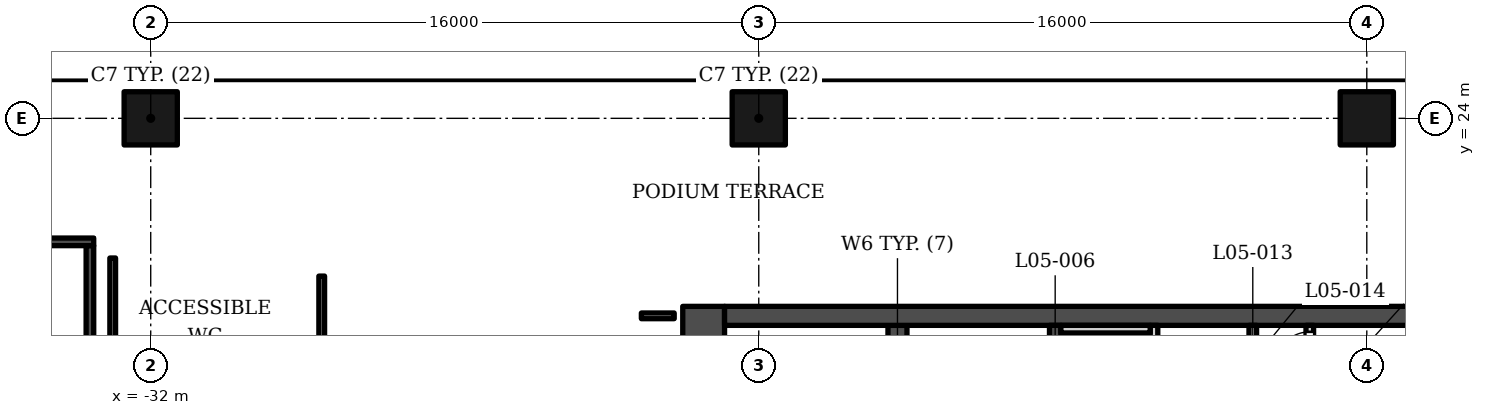
"""IFC4 building model, lengths in metres.
Left out: names, types, materials, properties, quantities, classifications, styles, units other than length and angle.
Written with IfcOpenShell. Run it as: python <this file> out.ifc"""

import sys

from ifc_helpers import new_model, si_unit, direction, frame, frame_2d, origin, origin_2d, place, context, subcontext, project, spatial, rectangle, extrude, element, fill, save


model = new_model("IFC4")
c1 = context("Model", 3, precision=1e-05, world=origin(), true_north=direction((0.0, 1.0)))
c2 = subcontext(c1, "Body", "Model", "MODEL_VIEW")
j1 = project(units=[si_unit("LENGTHUNIT", "METRE"), si_unit("PLANEANGLEUNIT", "RADIAN")], contexts=[c1])
p1 = place(None, origin())
s1 = spatial("IfcSite", under=j1, at=p1, CompositionType="ELEMENT")
p2 = place(p1, origin())
s2 = spatial("IfcBuilding", under=s1, at=p2, CompositionType="ELEMENT")
p3 = place(p2, frame((0.0, 0.0, 40.0)))
s3 = spatial("IfcBuildingStorey", under=s2, at=p3, CompositionType="ELEMENT", Elevation=40.0)
for number, where, z_axis, x_axis in (
    (1, (-32.0, 24.0, 0.0), (0.0, 0.0, 1.0), (1.0, 0.0, 0.0)),
    (2, (-16.0, 24.0, 0.0), (0.0, 0.0, 1.0), (1.0, 0.0, 0.0)),
    (3, (0.0, 24.0, 0.0), (0.0, 0.0, 1.0), (1.0, 0.0, 0.0)),
):
    element("IfcColumn", number, at=place(p3, frame(where, z_axis=z_axis, x_axis=x_axis)), inside=s3, PredefinedType="COLUMN", context=c2, shape_type="SweptSolid", body=[
        extrude(rectangle(XDim=1.4, YDim=1.4, at=origin_2d()), origin(), (0.0, 0.0, 1.0), 6.0),
    ])
p4 = place(p3, frame((-16.9, 18.802, 0.0), z_axis=(0.0, 0.0, 1.0), x_axis=(1.0, 0.0, 0.0)))
e4 = element("IfcWall", 4, at=p4, inside=s3, PredefinedType="SHEAR", context=c2, shape_type="SweptSolid", body=[
    extrude(rectangle(XDim=33.8, YDim=0.5, at=frame_2d((16.9, 0.0))), origin(), (0.0, 0.0, 1.0), 6.0),
])
p5 = place(p3, frame((-12.35, 5.253, 0.0), z_axis=(0.0, 0.0, 1.0), x_axis=(0.0, 1.0, 0.0)))
e5 = element("IfcWall", 5, at=p5, inside=s3, PredefinedType="SHEAR", context=c2, shape_type="SweptSolid", body=[
    extrude(rectangle(XDim=13.3, YDim=0.5, at=frame_2d((6.65, 0.0))), origin(), (0.0, 0.0, 1.0), 6.0),
])
p6 = place(p3, frame((-8.2, 5.253, 0.0), z_axis=(0.0, 0.0, 1.0), x_axis=(0.0, 1.0, 0.0)))
e6 = element("IfcWall", 6, at=p6, inside=s3, PredefinedType="SHEAR", context=c2, shape_type="SweptSolid", body=[
    extrude(rectangle(XDim=13.3, YDim=0.3, at=frame_2d((6.65, 0.0))), origin(), (0.0, 0.0, 1.0), 6.0),
])
p7 = place(p6, frame((7.1, 0.0, 0.0)))
e7 = element("IfcOpeningElement", 7, at=p7, cuts=e6, PredefinedType="OPENING", context=c2, shape_type="SweptSolid", body=[
    extrude(rectangle(XDim=1.4, YDim=2.1, at=frame_2d((0.7, 1.05))), frame((0.0, 0.16, 0.0), z_axis=(0.0, -1.0, 0.0), x_axis=(1.0, 0.0, 0.0)), (0.0, 0.0, 1.0), 0.32),
])
p8 = place(p6, frame((5.05, 0.0, 0.0)))
e8 = element("IfcOpeningElement", 8, at=p8, cuts=e6, PredefinedType="OPENING", context=c2, shape_type="SweptSolid", body=[
    extrude(rectangle(XDim=1.4, YDim=2.1, at=frame_2d((0.7, 1.05))), frame((0.0, 0.16, 0.0), z_axis=(0.0, -1.0, 0.0), x_axis=(1.0, 0.0, 0.0)), (0.0, 0.0, 1.0), 0.32),
])
p9 = place(p3, frame((-17.45, 5.853, 0.0), z_axis=(0.0, 0.0, 1.0), x_axis=(0.0, 1.0, 0.0)))
e9 = element("IfcWall", 9, at=p9, inside=s3, PredefinedType="SHEAR", context=c2, shape_type="SweptSolid", body=[
    extrude(rectangle(XDim=13.2, YDim=1.1, at=frame_2d((6.6, 0.0))), origin(), (0.0, 0.0, 1.0), 6.0),
])
p10 = place(p9, frame((4.1, 0.0, 0.0)))
e10 = element("IfcOpeningElement", 10, at=p10, cuts=e9, PredefinedType="OPENING", context=c2, shape_type="SweptSolid", body=[
    extrude(rectangle(XDim=1.6, YDim=2.1, at=frame_2d((0.8, 1.05))), frame((0.0, 0.56, 0.0), z_axis=(0.0, -1.0, 0.0), x_axis=(1.0, 0.0, 0.0)), (0.0, 0.0, 1.0), 1.12),
])
p11 = place(p9, frame((9.75, 0.0, 0.0)))
e11 = element("IfcOpeningElement", 11, at=p11, cuts=e9, PredefinedType="OPENING", context=c2, shape_type="SweptSolid", body=[
    extrude(rectangle(XDim=0.9, YDim=2.1, at=frame_2d((0.45, 1.05))), frame((0.0, 0.56, 0.0), z_axis=(0.0, -1.0, 0.0), x_axis=(1.0, 0.0, 0.0)), (0.0, 0.0, 1.0), 1.12),
])
p12 = place(p3, frame((-5.6, 14.253, 0.0), z_axis=(0.0, 0.0, 1.0), x_axis=(0.0, 1.0, 0.0)))
e12 = element("IfcWall", 12, at=p12, inside=s3, PredefinedType="SOLIDWALL", context=c2, shape_type="SweptSolid", body=[
    extrude(rectangle(XDim=4.3, YDim=0.2, at=frame_2d((2.15, 0.0))), origin(), (0.0, 0.0, 1.0), 5.55),
])
p13 = place(p3, frame((-3.0, 15.503, 0.0), z_axis=(0.0, 0.0, 1.0), x_axis=(0.0, 1.0, 0.0)))
e13 = element("IfcWall", 13, at=p13, inside=s3, PredefinedType="SOLIDWALL", context=c2, shape_type="SweptSolid", body=[
    extrude(rectangle(XDim=3.05, YDim=0.2, at=frame_2d((1.525, 0.0))), origin(), (0.0, 0.0, 1.0), 5.55),
])
p14 = place(p13, frame((0.12, 0.0, 0.0)))
e14 = element("IfcOpeningElement", 14, at=p14, cuts=e13, PredefinedType="OPENING", context=c2, shape_type="SweptSolid", body=[
    extrude(rectangle(XDim=0.9, YDim=2.1, at=frame_2d((0.45, 1.05))), frame((0.0, 0.11, 0.0), z_axis=(0.0, -1.0, 0.0), x_axis=(1.0, 0.0, 0.0)), (0.0, 0.0, 1.0), 0.22),
])
p15 = place(p13, frame((1.67, 0.0, 0.0)))
e15 = element("IfcOpeningElement", 15, at=p15, cuts=e13, PredefinedType="OPENING", context=c2, shape_type="SweptSolid", body=[
    extrude(rectangle(XDim=0.9, YDim=2.1, at=frame_2d((0.45, 1.05))), frame((0.0, 0.11, 0.0), z_axis=(0.0, -1.0, 0.0), x_axis=(1.0, 0.0, 0.0)), (0.0, 0.0, 1.0), 0.22),
])
p16 = place(p3, frame((-1.5, 15.503, 0.0), z_axis=(0.0, 0.0, 1.0), x_axis=(0.0, 1.0, 0.0)))
e16 = element("IfcWall", 16, at=p16, inside=s3, PredefinedType="SOLIDWALL", context=c2, shape_type="SweptSolid", body=[
    extrude(rectangle(XDim=3.05, YDim=0.2, at=frame_2d((1.525, 0.0))), origin(), (0.0, 0.0, 1.0), 5.55),
])
p17 = place(p16, frame((0.43, 0.0, 0.0)))
e17 = element("IfcOpeningElement", 17, at=p17, cuts=e16, PredefinedType="OPENING", context=c2, shape_type="SweptSolid", body=[
    extrude(rectangle(XDim=0.9, YDim=2.1, at=frame_2d((0.45, 1.05))), frame((0.0, 0.11, 0.0), z_axis=(0.0, -1.0, 0.0), x_axis=(1.0, 0.0, 0.0)), (0.0, 0.0, 1.0), 0.22),
])
p18 = place(p16, frame((1.98, 0.0, 0.0)))
e18 = element("IfcOpeningElement", 18, at=p18, cuts=e16, PredefinedType="OPENING", context=c2, shape_type="SweptSolid", body=[
    extrude(rectangle(XDim=0.9, YDim=2.1, at=frame_2d((0.45, 1.05))), frame((0.0, 0.11, 0.0), z_axis=(0.0, -1.0, 0.0), x_axis=(1.0, 0.0, 0.0)), (0.0, 0.0, 1.0), 0.22),
])
p19 = place(p3, frame((-8.05, 18.453, 0.0), z_axis=(0.0, 0.0, 1.0), x_axis=(1.0, 0.0, 0.0)))
e19 = element("IfcWall", 19, at=p19, inside=s3, PredefinedType="SOLIDWALL", context=c2, shape_type="SweptSolid", body=[
    extrude(rectangle(XDim=2.35, YDim=0.2, at=frame_2d((1.175, 0.0))), origin(), (0.0, 0.0, 1.0), 5.55),
])
p20 = place(p3, frame((-38.37, 20.75, 0.0), z_axis=(0.0, 0.0, 1.0), x_axis=(1.0, 0.0, 0.0)))
e20 = element("IfcWall", 20, at=p20, inside=s3, PredefinedType="SOLIDWALL", context=c2, shape_type="SweptSolid", body=[
    extrude(rectangle(XDim=4.87, YDim=0.2, at=frame_2d((2.435, 0.0))), origin(), (0.0, 0.0, 1.0), 3.0),
])
p21 = place(p3, frame((-33.6, 14.0, 0.0), z_axis=(0.0, 0.0, 1.0), x_axis=(0.0, 1.0, 0.0)))
e21 = element("IfcWall", 21, at=p21, inside=s3, PredefinedType="SOLIDWALL", context=c2, shape_type="SweptSolid", body=[
    extrude(rectangle(XDim=6.65, YDim=0.2, at=frame_2d((3.325, 0.0))), origin(), (0.0, 0.0, 1.0), 3.0),
])
p22 = place(p21, frame((0.1, 0.0, 0.0)))
e22 = element("IfcOpeningElement", 22, at=p22, cuts=e21, PredefinedType="OPENING", context=c2, shape_type="SweptSolid", body=[
    extrude(rectangle(XDim=1.8, YDim=2.4, at=frame_2d((0.9, 1.2))), frame((0.0, 0.11, 0.0), z_axis=(0.0, -1.0, 0.0), x_axis=(1.0, 0.0, 0.0)), (0.0, 0.0, 1.0), 0.22),
])
p23 = place(p3, frame((-33.0, 17.075, 0.0), z_axis=(0.0, 0.0, 1.0), x_axis=(0.0, 1.0, 0.0)))
e23 = element("IfcWall", 23, at=p23, inside=s3, PredefinedType="PARTITIONING", context=c2, shape_type="SweptSolid", body=[
    extrude(rectangle(XDim=3.25, YDim=0.15, at=frame_2d((1.625, 0.0))), origin(), (0.0, 0.0, 1.0), 5.55),
])
p24 = place(p3, frame((-27.5, 17.075, 0.0), z_axis=(0.0, 0.0, 1.0), x_axis=(0.0, 1.0, 0.0)))
e24 = element("IfcWall", 24, at=p24, inside=s3, PredefinedType="PARTITIONING", context=c2, shape_type="SweptSolid", body=[
    extrude(rectangle(XDim=2.774, YDim=0.15, at=frame_2d((1.387, 0.0))), origin(), (0.0, 0.0, 1.0), 2.95),
])
p25 = place(p3, frame((-19.089, 18.803, 0.0), z_axis=(0.0, 0.0, 1.0), x_axis=(1.0, 0.0, 0.0)))
e25 = element("IfcWall", 25, at=p25, inside=s3, PredefinedType="PARTITIONING", context=c2, shape_type="SweptSolid", body=[
    extrude(rectangle(XDim=0.864, YDim=0.15, at=frame_2d((0.432, 0.0))), origin(), (0.0, 0.0, 1.0), 5.55),
])
p26 = place(p18, origin())
e26 = element("IfcDoor", 26, at=p26, inside=s3, OperationType="SINGLE_SWING_LEFT", PredefinedType="DOOR", context=c2, shape_type="SweptSolid", body=[
    extrude(rectangle(XDim=0.9, YDim=2.1, at=frame_2d((0.45, 1.05))), frame((0.0, 0.025, 0.0), z_axis=(0.0, -1.0, 0.0), x_axis=(1.0, 0.0, 0.0)), (0.0, 0.0, 1.0), 0.05),
])
fill(e18, e26)
save(model, sys.argv[1])
